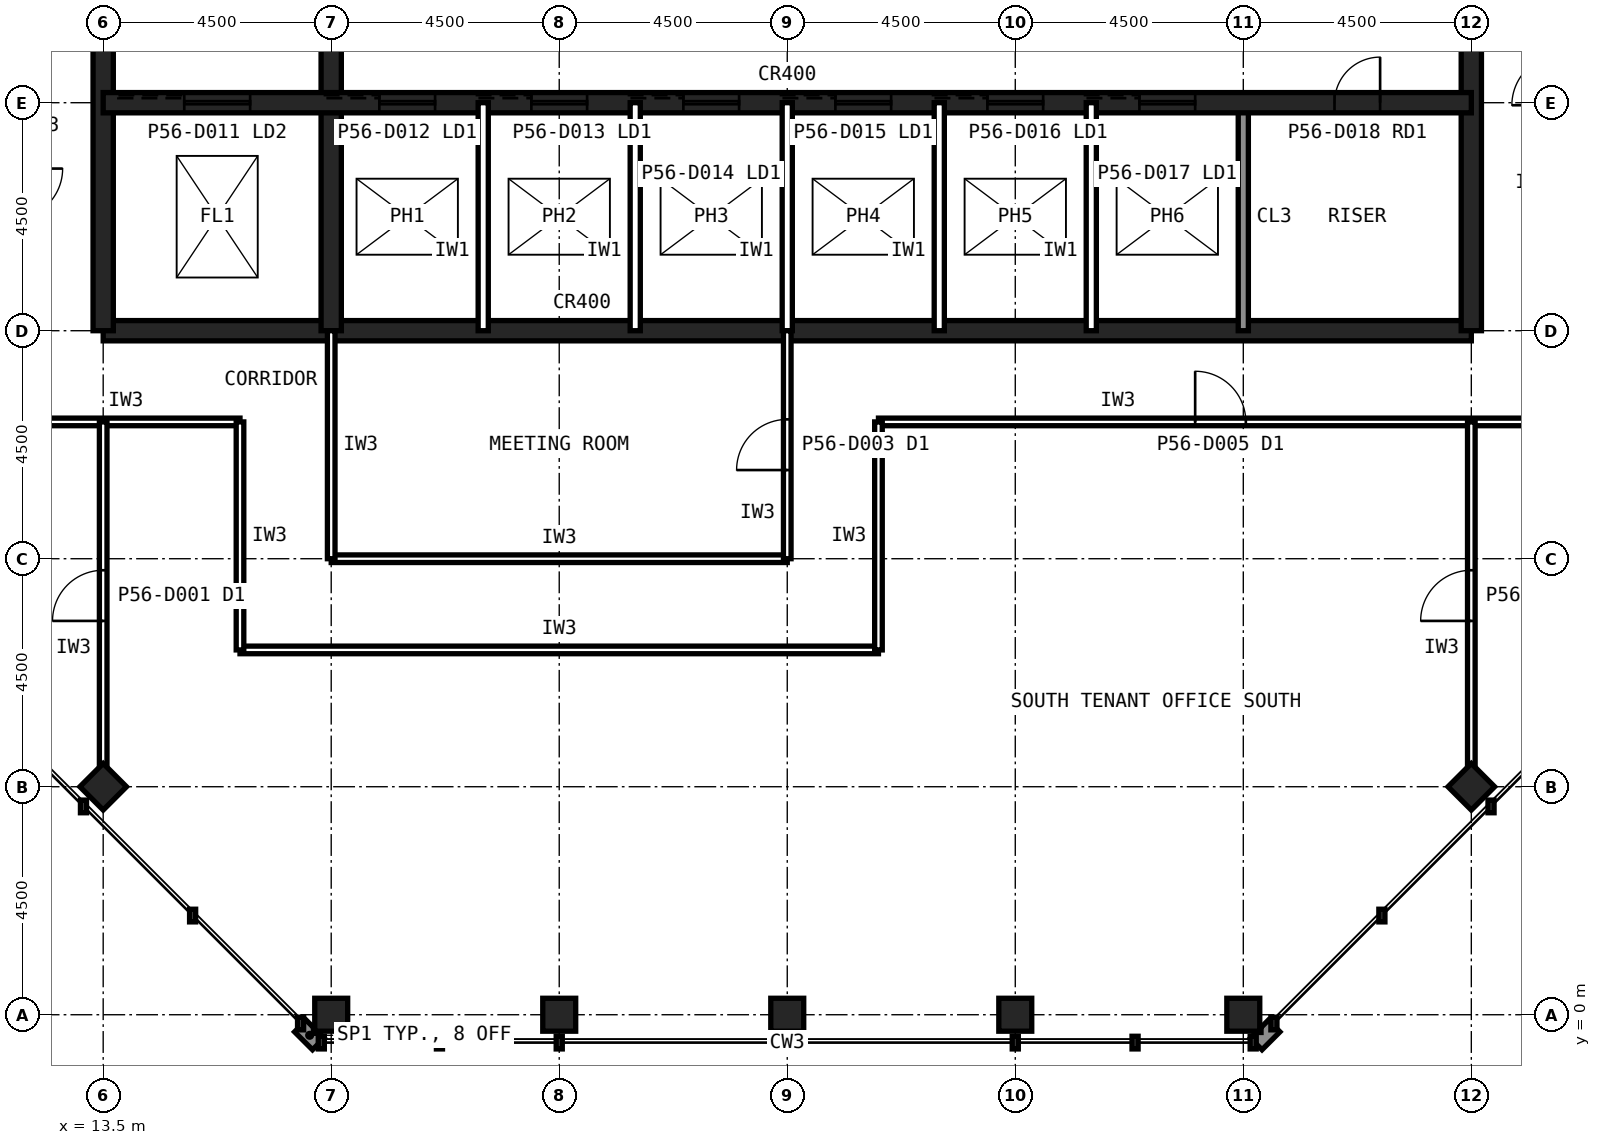
"""IFC4 building model, lengths in metres.
Left out: names, types, materials, properties, quantities, classifications, styles, units other than length and angle.
Written with IfcOpenShell. Run it as: python <this file> out.ifc"""

import sys

from ifc_helpers import new_model, si_unit, direction, frame, frame_2d, origin, origin_2d, place, context, subcontext, project, spatial, rectangle, hollow_rectangle, extrude, element, fill, save


model = new_model("IFC4")
c1 = context("Model", 3, precision=1e-05, world=origin(), true_north=direction((0.0, 1.0)))
c2 = subcontext(c1, "Body", "Model", "MODEL_VIEW")
j1 = project(units=[si_unit("LENGTHUNIT", "METRE"), si_unit("PLANEANGLEUNIT", "RADIAN")], contexts=[c1])
p1 = place(None, origin())
s1 = spatial("IfcSite", under=j1, at=p1, CompositionType="ELEMENT")
p2 = place(p1, origin())
s2 = spatial("IfcBuilding", under=s1, at=p2, CompositionType="ELEMENT")
p3 = place(p2, frame((0.0, 0.0, 238.6)))
s3 = spatial("IfcBuildingStorey", under=s2, at=p3, CompositionType="ELEMENT", Elevation=238.6)
for number, where, z_axis, x_axis in (
    (1, (18.0, 0.0, 0.0), (0.0, 0.0, 1.0), (1.0, 0.0, 0.0)),
    (2, (22.5, 0.0, 0.0), (0.0, 0.0, 1.0), (1.0, 0.0, 0.0)),
    (3, (27.0, 0.0, 0.0), (0.0, 0.0, 1.0), (1.0, 0.0, 0.0)),
    (4, (31.5, 0.0, 0.0), (0.0, 0.0, 1.0), (1.0, 0.0, 0.0)),
    (5, (36.0, 0.0, 0.0), (0.0, 0.0, 1.0), (1.0, 0.0, 0.0)),
    (6, (13.5, 4.5, 0.0), (0.0, 0.0, 1.0), (0.707, 0.707, 0.0)),
    (7, (40.5, 4.5, 0.0), (0.0, 0.0, 1.0), (0.707, 0.707, 0.0)),
):
    element("IfcColumn", number, at=place(p3, frame(where, z_axis=z_axis, x_axis=x_axis)), inside=s3, PredefinedType="COLUMN", context=c2, shape_type="SweptSolid", body=[
        extrude(hollow_rectangle(XDim=0.65, YDim=0.65, WallThickness=0.032, at=origin_2d()), origin(), (0.0, 0.0, 1.0), 4.0),
    ])
p4 = place(p3, frame((13.5, 13.5, 0.0), z_axis=(0.0, 0.0, 1.0), x_axis=(1.0, 0.0, 0.0)))
e8 = element("IfcWall", 8, at=p4, inside=s3, PredefinedType="SHEAR", context=c2, shape_type="SweptSolid", body=[
    extrude(rectangle(XDim=27.0, YDim=0.4, at=frame_2d((13.5, 0.0))), origin(), (0.0, 0.0, 1.0), 4.0),
])
p5 = place(p3, frame((40.5, 13.5, 0.0), z_axis=(0.0, 0.0, 1.0), x_axis=(0.0, 1.0, 0.0)))
e9 = element("IfcWall", 9, at=p5, inside=s3, PredefinedType="SHEAR", context=c2, shape_type="SweptSolid", body=[
    extrude(rectangle(XDim=27.0, YDim=0.4, at=frame_2d((13.5, 0.0))), origin(), (0.0, 0.0, 1.0), 4.0),
])
p6 = place(p5, frame((5.85, 0.0, 0.0)))
e10 = element("IfcOpeningElement", 10, at=p6, cuts=e9, PredefinedType="OPENING", context=c2, shape_type="SweptSolid", body=[
    extrude(rectangle(XDim=1.8, YDim=2.1, at=frame_2d((0.9, 1.05))), frame((0.0, 0.21, 0.0), z_axis=(0.0, -1.0, 0.0), x_axis=(1.0, 0.0, 0.0)), (0.0, 0.0, 1.0), 0.42),
])
p7 = place(p5, frame((19.65, 0.0, 0.0)))
e11 = element("IfcOpeningElement", 11, at=p7, cuts=e9, PredefinedType="OPENING", context=c2, shape_type="SweptSolid", body=[
    extrude(rectangle(XDim=1.2, YDim=2.1, at=frame_2d((0.6, 1.05))), frame((0.0, 0.21, 0.0), z_axis=(0.0, -1.0, 0.0), x_axis=(1.0, 0.0, 0.0)), (0.0, 0.0, 1.0), 0.42),
])
p8 = place(p3, frame((13.5, 40.5, 0.0), z_axis=(0.0, 0.0, 1.0), x_axis=(0.0, -1.0, 0.0)))
e12 = element("IfcWall", 12, at=p8, inside=s3, PredefinedType="SHEAR", context=c2, shape_type="SweptSolid", body=[
    extrude(rectangle(XDim=27.0, YDim=0.4, at=frame_2d((13.5, 0.0))), origin(), (0.0, 0.0, 1.0), 4.0),
])
p9 = place(p8, frame((19.65, 0.0, 0.0)))
e13 = element("IfcOpeningElement", 13, at=p9, cuts=e12, PredefinedType="OPENING", context=c2, shape_type="SweptSolid", body=[
    extrude(rectangle(XDim=1.2, YDim=2.1, at=frame_2d((0.6, 1.05))), frame((0.0, 0.21, 0.0), z_axis=(0.0, -1.0, 0.0), x_axis=(1.0, 0.0, 0.0)), (0.0, 0.0, 1.0), 0.42),
])
p10 = place(p8, frame((5.85, 0.0, 0.0)))
e14 = element("IfcOpeningElement", 14, at=p10, cuts=e12, PredefinedType="OPENING", context=c2, shape_type="SweptSolid", body=[
    extrude(rectangle(XDim=1.8, YDim=2.1, at=frame_2d((0.9, 1.05))), frame((0.0, 0.21, 0.0), z_axis=(0.0, -1.0, 0.0), x_axis=(1.0, 0.0, 0.0)), (0.0, 0.0, 1.0), 0.42),
])
p11 = place(p3, frame((18.0, 13.5, 0.0), z_axis=(0.0, 0.0, 1.0), x_axis=(0.0, 1.0, 0.0)))
e15 = element("IfcWall", 15, at=p11, inside=s3, PredefinedType="SHEAR", context=c2, shape_type="SweptSolid", body=[
    extrude(rectangle(XDim=18.0, YDim=0.4, at=frame_2d((9.0, 0.0))), origin(), (0.0, 0.0, 1.0), 4.0),
])
p12 = place(p3, frame((36.0, 13.5, 0.0), z_axis=(0.0, 0.0, 1.0), x_axis=(0.0, 1.0, 0.0)))
e16 = element("IfcWall", 16, at=p12, inside=s3, PredefinedType="SOLIDWALL", context=c2, shape_type="SweptSolid", body=[
    extrude(rectangle(XDim=4.5, YDim=0.2, at=frame_2d((2.25, 0.0))), origin(), (0.0, 0.0, 1.0), 3.84),
])
p13 = place(p3, frame((13.5, 18.0, 0.0), z_axis=(0.0, 0.0, 1.0), x_axis=(1.0, 0.0, 0.0)))
e17 = element("IfcWall", 17, at=p13, inside=s3, PredefinedType="SHEAR", context=c2, shape_type="SweptSolid", body=[
    extrude(rectangle(XDim=27.0, YDim=0.4, at=frame_2d((13.5, 0.0))), origin(), (0.0, 0.0, 1.0), 4.0),
])
p14 = place(p13, frame((24.3, 0.0, 0.0)))
e18 = element("IfcOpeningElement", 18, at=p14, cuts=e17, PredefinedType="OPENING", context=c2, shape_type="SweptSolid", body=[
    extrude(rectangle(XDim=0.9, YDim=2.1, at=frame_2d((0.45, 1.05))), frame((0.0, 0.21, 0.0), z_axis=(0.0, -1.0, 0.0), x_axis=(1.0, 0.0, 0.0)), (0.0, 0.0, 1.0), 0.42),
])
p15 = place(p13, frame((5.45, 0.0, 0.0)))
e19 = element("IfcOpeningElement", 19, at=p15, cuts=e17, PredefinedType="OPENING", context=c2, shape_type="SweptSolid", body=[
    extrude(rectangle(XDim=1.1, YDim=2.1, at=frame_2d((0.55, 1.05))), frame((0.0, 0.21, 0.0), z_axis=(0.0, -1.0, 0.0), x_axis=(1.0, 0.0, 0.0)), (0.0, 0.0, 1.0), 0.42),
])
p16 = place(p13, frame((8.45, 0.0, 0.0)))
e20 = element("IfcOpeningElement", 20, at=p16, cuts=e17, PredefinedType="OPENING", context=c2, shape_type="SweptSolid", body=[
    extrude(rectangle(XDim=1.1, YDim=2.1, at=frame_2d((0.55, 1.05))), frame((0.0, 0.21, 0.0), z_axis=(0.0, -1.0, 0.0), x_axis=(1.0, 0.0, 0.0)), (0.0, 0.0, 1.0), 0.42),
])
p17 = place(p13, frame((11.45, 0.0, 0.0)))
e21 = element("IfcOpeningElement", 21, at=p17, cuts=e17, PredefinedType="OPENING", context=c2, shape_type="SweptSolid", body=[
    extrude(rectangle(XDim=1.1, YDim=2.1, at=frame_2d((0.55, 1.05))), frame((0.0, 0.21, 0.0), z_axis=(0.0, -1.0, 0.0), x_axis=(1.0, 0.0, 0.0)), (0.0, 0.0, 1.0), 0.42),
])
p18 = place(p13, frame((14.45, 0.0, 0.0)))
e22 = element("IfcOpeningElement", 22, at=p18, cuts=e17, PredefinedType="OPENING", context=c2, shape_type="SweptSolid", body=[
    extrude(rectangle(XDim=1.1, YDim=2.1, at=frame_2d((0.55, 1.05))), frame((0.0, 0.21, 0.0), z_axis=(0.0, -1.0, 0.0), x_axis=(1.0, 0.0, 0.0)), (0.0, 0.0, 1.0), 0.42),
])
p19 = place(p13, frame((17.45, 0.0, 0.0)))
e23 = element("IfcOpeningElement", 23, at=p19, cuts=e17, PredefinedType="OPENING", context=c2, shape_type="SweptSolid", body=[
    extrude(rectangle(XDim=1.1, YDim=2.1, at=frame_2d((0.55, 1.05))), frame((0.0, 0.21, 0.0), z_axis=(0.0, -1.0, 0.0), x_axis=(1.0, 0.0, 0.0)), (0.0, 0.0, 1.0), 0.42),
])
p20 = place(p13, frame((20.45, 0.0, 0.0)))
e24 = element("IfcOpeningElement", 24, at=p20, cuts=e17, PredefinedType="OPENING", context=c2, shape_type="SweptSolid", body=[
    extrude(rectangle(XDim=1.1, YDim=2.1, at=frame_2d((0.55, 1.05))), frame((0.0, 0.21, 0.0), z_axis=(0.0, -1.0, 0.0), x_axis=(1.0, 0.0, 0.0)), (0.0, 0.0, 1.0), 0.42),
])
p21 = place(p13, frame((1.6, 0.0, 0.0)))
e25 = element("IfcOpeningElement", 25, at=p21, cuts=e17, PredefinedType="OPENING", context=c2, shape_type="SweptSolid", body=[
    extrude(rectangle(XDim=1.3, YDim=2.2, at=frame_2d((0.65, 1.1))), frame((0.0, 0.21, 0.0), z_axis=(0.0, -1.0, 0.0), x_axis=(1.0, 0.0, 0.0)), (0.0, 0.0, 1.0), 0.42),
])
for number, where, z_axis, x_axis in (
    (26, (21.0, 13.5, 0.0), (0.0, 0.0, 1.0), (0.0, 1.0, 0.0)),
    (27, (24.0, 13.5, 0.0), (0.0, 0.0, 1.0), (0.0, 1.0, 0.0)),
    (28, (27.0, 13.5, 0.0), (0.0, 0.0, 1.0), (0.0, 1.0, 0.0)),
    (29, (30.0, 13.5, 0.0), (0.0, 0.0, 1.0), (0.0, 1.0, 0.0)),
    (30, (33.0, 13.5, 0.0), (0.0, 0.0, 1.0), (0.0, 1.0, 0.0)),
):
    element("IfcWall", number, at=place(p3, frame(where, z_axis=z_axis, x_axis=x_axis)), inside=s3, PredefinedType="PARTITIONING", context=c2, shape_type="SweptSolid", body=[
        extrude(rectangle(XDim=4.5, YDim=0.2, at=frame_2d((2.25, 0.0))), origin(), (0.0, 0.0, 1.0), 3.84),
    ])
p22 = place(p3, frame((28.8, 11.7, 0.0), z_axis=(0.0, 0.0, 1.0), x_axis=(1.0, 0.0, 0.0)))
e31 = element("IfcWall", 31, at=p22, inside=s3, PredefinedType="PARTITIONING", context=c2, shape_type="SweptSolid", body=[
    extrude(rectangle(XDim=13.5, YDim=0.15, at=frame_2d((6.75, 0.0))), origin(), (0.0, 0.0, 1.0), 3.84),
])
p23 = place(p22, frame((6.25, 0.0, 0.0)))
e32 = element("IfcOpeningElement", 32, at=p23, cuts=e31, PredefinedType="OPENING", context=c2, shape_type="SweptSolid", body=[
    extrude(rectangle(XDim=1.0, YDim=2.1, at=frame_2d((0.5, 1.05))), frame((0.0, 0.085, 0.0), z_axis=(0.0, -1.0, 0.0), x_axis=(1.0, 0.0, 0.0)), (0.0, 0.0, 1.0), 0.17),
])
p24 = place(p3, frame((16.2, 7.2, 0.0), z_axis=(0.0, 0.0, 1.0), x_axis=(1.0, 0.0, 0.0)))
e33 = element("IfcWall", 33, at=p24, inside=s3, PredefinedType="PARTITIONING", context=c2, shape_type="SweptSolid", body=[
    extrude(rectangle(XDim=12.6, YDim=0.15, at=frame_2d((6.3, 0.0))), origin(), (0.0, 0.0, 1.0), 3.84),
])
for number, where, z_axis, x_axis in (
    (34, (11.7, 11.7, 0.0), (0.0, 0.0, 1.0), (1.0, 0.0, 0.0)),
    (35, (16.2, 11.7, 0.0), (0.0, 0.0, 1.0), (0.0, -1.0, 0.0)),
    (36, (28.8, 7.2, 0.0), (0.0, 0.0, 1.0), (0.0, 1.0, 0.0)),
):
    element("IfcWall", number, at=place(p3, frame(where, z_axis=z_axis, x_axis=x_axis)), inside=s3, PredefinedType="PARTITIONING", context=c2, shape_type="SweptSolid", body=[
        extrude(rectangle(XDim=4.5, YDim=0.15, at=frame_2d((2.25, 0.0))), origin(), (0.0, 0.0, 1.0), 3.84),
    ])
p25 = place(p3, frame((18.0, 9.0, 0.0), z_axis=(0.0, 0.0, 1.0), x_axis=(1.0, 0.0, 0.0)))
e37 = element("IfcWall", 37, at=p25, inside=s3, PredefinedType="PARTITIONING", context=c2, shape_type="SweptSolid", body=[
    extrude(rectangle(XDim=9.0, YDim=0.15, at=frame_2d((4.5, 0.0))), origin(), (0.0, 0.0, 1.0), 3.84),
])
p26 = place(p3, frame((27.0, 9.0, 0.0), z_axis=(0.0, 0.0, 1.0), x_axis=(0.0, 1.0, 0.0)))
e38 = element("IfcWall", 38, at=p26, inside=s3, PredefinedType="PARTITIONING", context=c2, shape_type="SweptSolid", body=[
    extrude(rectangle(XDim=4.5, YDim=0.15, at=frame_2d((2.25, 0.0))), origin(), (0.0, 0.0, 1.0), 2.989),
])
p27 = place(p26, frame((1.75, 0.0, 0.0)))
e39 = element("IfcOpeningElement", 39, at=p27, cuts=e38, PredefinedType="OPENING", context=c2, shape_type="SweptSolid", body=[
    extrude(rectangle(XDim=1.0, YDim=2.1, at=frame_2d((0.5, 1.05))), frame((0.0, 0.085, 0.0), z_axis=(0.0, -1.0, 0.0), x_axis=(1.0, 0.0, 0.0)), (0.0, 0.0, 1.0), 0.17),
])
p28 = place(p3, frame((18.0, 13.5, 0.0), z_axis=(0.0, 0.0, 1.0), x_axis=(0.0, -1.0, 0.0)))
e40 = element("IfcWall", 40, at=p28, inside=s3, PredefinedType="PARTITIONING", context=c2, shape_type="SweptSolid", body=[
    extrude(rectangle(XDim=4.5, YDim=0.15, at=frame_2d((2.25, 0.0))), origin(), (0.0, 0.0, 1.0), 2.989),
])
p29 = place(p3, frame((40.5, 4.845, 0.0), z_axis=(0.0, 0.0, 1.0), x_axis=(0.0, 1.0, 0.0)))
e41 = element("IfcWall", 41, at=p29, inside=s3, PredefinedType="PARTITIONING", context=c2, shape_type="SweptSolid", body=[
    extrude(rectangle(XDim=6.855, YDim=0.15, at=frame_2d((3.427, 0.0))), origin(), (0.0, 0.0, 1.0), 2.989),
])
p30 = place(p29, frame((2.927, 0.0, 0.0)))
e42 = element("IfcOpeningElement", 42, at=p30, cuts=e41, PredefinedType="OPENING", context=c2, shape_type="SweptSolid", body=[
    extrude(rectangle(XDim=1.0, YDim=2.1, at=frame_2d((0.5, 1.05))), frame((0.0, 0.085, 0.0), z_axis=(0.0, -1.0, 0.0), x_axis=(1.0, 0.0, 0.0)), (0.0, 0.0, 1.0), 0.17),
])
p31 = place(p3, frame((13.5, 4.845, 0.0), z_axis=(0.0, 0.0, 1.0), x_axis=(0.0, 1.0, 0.0)))
e43 = element("IfcWall", 43, at=p31, inside=s3, PredefinedType="PARTITIONING", context=c2, shape_type="SweptSolid", body=[
    extrude(rectangle(XDim=6.855, YDim=0.15, at=frame_2d((3.427, 0.0))), origin(), (0.0, 0.0, 1.0), 2.989),
])
p32 = place(p31, frame((2.927, 0.0, 0.0)))
e44 = element("IfcOpeningElement", 44, at=p32, cuts=e43, PredefinedType="OPENING", context=c2, shape_type="SweptSolid", body=[
    extrude(rectangle(XDim=1.0, YDim=2.1, at=frame_2d((0.5, 1.05))), frame((0.0, 0.085, 0.0), z_axis=(0.0, -1.0, 0.0), x_axis=(1.0, 0.0, 0.0)), (0.0, 0.0, 1.0), 0.17),
])
p33 = place(p14, origin())
e45 = element("IfcDoor", 45, at=p33, inside=s3, OperationType="SINGLE_SWING_RIGHT", PredefinedType="DOOR", context=c2, shape_type="SweptSolid", body=[
    extrude(rectangle(XDim=0.9, YDim=2.1, at=frame_2d((0.45, 1.05))), frame((0.0, 0.025, 0.0), z_axis=(0.0, -1.0, 0.0), x_axis=(1.0, 0.0, 0.0)), (0.0, 0.0, 1.0), 0.05),
])
fill(e18, e45)
p34 = place(p15, origin())
e46 = element("IfcDoor", 46, at=p34, inside=s3, OperationType="SLIDING_TO_LEFT", PredefinedType="DOOR", context=c2, shape_type="SweptSolid", body=[
    extrude(rectangle(XDim=1.1, YDim=2.1, at=frame_2d((0.55, 1.05))), frame((0.0, 0.025, 0.0), z_axis=(0.0, -1.0, 0.0), x_axis=(1.0, 0.0, 0.0)), (0.0, 0.0, 1.0), 0.05),
])
fill(e19, e46)
p35 = place(p16, origin())
e47 = element("IfcDoor", 47, at=p35, inside=s3, OperationType="SLIDING_TO_LEFT", PredefinedType="DOOR", context=c2, shape_type="SweptSolid", body=[
    extrude(rectangle(XDim=1.1, YDim=2.1, at=frame_2d((0.55, 1.05))), frame((0.0, 0.025, 0.0), z_axis=(0.0, -1.0, 0.0), x_axis=(1.0, 0.0, 0.0)), (0.0, 0.0, 1.0), 0.05),
])
fill(e20, e47)
p36 = place(p17, origin())
e48 = element("IfcDoor", 48, at=p36, inside=s3, OperationType="SLIDING_TO_LEFT", PredefinedType="DOOR", context=c2, shape_type="SweptSolid", body=[
    extrude(rectangle(XDim=1.1, YDim=2.1, at=frame_2d((0.55, 1.05))), frame((0.0, 0.025, 0.0), z_axis=(0.0, -1.0, 0.0), x_axis=(1.0, 0.0, 0.0)), (0.0, 0.0, 1.0), 0.05),
])
fill(e21, e48)
p37 = place(p18, origin())
e49 = element("IfcDoor", 49, at=p37, inside=s3, OperationType="SLIDING_TO_LEFT", PredefinedType="DOOR", context=c2, shape_type="SweptSolid", body=[
    extrude(rectangle(XDim=1.1, YDim=2.1, at=frame_2d((0.55, 1.05))), frame((0.0, 0.025, 0.0), z_axis=(0.0, -1.0, 0.0), x_axis=(1.0, 0.0, 0.0)), (0.0, 0.0, 1.0), 0.05),
])
fill(e22, e49)
p38 = place(p19, origin())
e50 = element("IfcDoor", 50, at=p38, inside=s3, OperationType="SLIDING_TO_LEFT", PredefinedType="DOOR", context=c2, shape_type="SweptSolid", body=[
    extrude(rectangle(XDim=1.1, YDim=2.1, at=frame_2d((0.55, 1.05))), frame((0.0, 0.025, 0.0), z_axis=(0.0, -1.0, 0.0), x_axis=(1.0, 0.0, 0.0)), (0.0, 0.0, 1.0), 0.05),
])
fill(e23, e50)
p39 = place(p20, origin())
e51 = element("IfcDoor", 51, at=p39, inside=s3, OperationType="SLIDING_TO_LEFT", PredefinedType="DOOR", context=c2, shape_type="SweptSolid", body=[
    extrude(rectangle(XDim=1.1, YDim=2.1, at=frame_2d((0.55, 1.05))), frame((0.0, 0.025, 0.0), z_axis=(0.0, -1.0, 0.0), x_axis=(1.0, 0.0, 0.0)), (0.0, 0.0, 1.0), 0.05),
])
fill(e24, e51)
p40 = place(p21, origin())
e52 = element("IfcDoor", 52, at=p40, inside=s3, OperationType="SLIDING_TO_LEFT", PredefinedType="DOOR", context=c2, shape_type="SweptSolid", body=[
    extrude(rectangle(XDim=1.3, YDim=2.2, at=frame_2d((0.65, 1.1))), frame((0.0, 0.025, 0.0), z_axis=(0.0, -1.0, 0.0), x_axis=(1.0, 0.0, 0.0)), (0.0, 0.0, 1.0), 0.05),
])
fill(e25, e52)
p41 = place(p23, origin())
e53 = element("IfcDoor", 53, at=p41, inside=s3, OperationType="SINGLE_SWING_LEFT", PredefinedType="DOOR", context=c2, shape_type="SweptSolid", body=[
    extrude(rectangle(XDim=1.0, YDim=2.1, at=frame_2d((0.5, 1.05))), frame((0.0, 0.025, 0.0), z_axis=(0.0, -1.0, 0.0), x_axis=(1.0, 0.0, 0.0)), (0.0, 0.0, 1.0), 0.05),
])
fill(e32, e53)
p42 = place(p27, origin())
e54 = element("IfcDoor", 54, at=p42, inside=s3, OperationType="SINGLE_SWING_LEFT", PredefinedType="DOOR", context=c2, shape_type="SweptSolid", body=[
    extrude(rectangle(XDim=1.0, YDim=2.1, at=frame_2d((0.5, 1.05))), frame((0.0, 0.025, 0.0), z_axis=(0.0, -1.0, 0.0), x_axis=(1.0, 0.0, 0.0)), (0.0, 0.0, 1.0), 0.05),
])
fill(e39, e54)
p43 = place(p30, origin())
e55 = element("IfcDoor", 55, at=p43, inside=s3, OperationType="SINGLE_SWING_LEFT", PredefinedType="DOOR", context=c2, shape_type="SweptSolid", body=[
    extrude(rectangle(XDim=1.0, YDim=2.1, at=frame_2d((0.5, 1.05))), frame((0.0, 0.025, 0.0), z_axis=(0.0, -1.0, 0.0), x_axis=(1.0, 0.0, 0.0)), (0.0, 0.0, 1.0), 0.05),
])
fill(e42, e55)
p44 = place(p32, origin())
e56 = element("IfcDoor", 56, at=p44, inside=s3, OperationType="SINGLE_SWING_LEFT", PredefinedType="DOOR", context=c2, shape_type="SweptSolid", body=[
    extrude(rectangle(XDim=1.0, YDim=2.1, at=frame_2d((0.5, 1.05))), frame((0.0, 0.025, 0.0), z_axis=(0.0, -1.0, 0.0), x_axis=(1.0, 0.0, 0.0)), (0.0, 0.0, 1.0), 0.05),
])
fill(e44, e56)
save(model, sys.argv[1])
